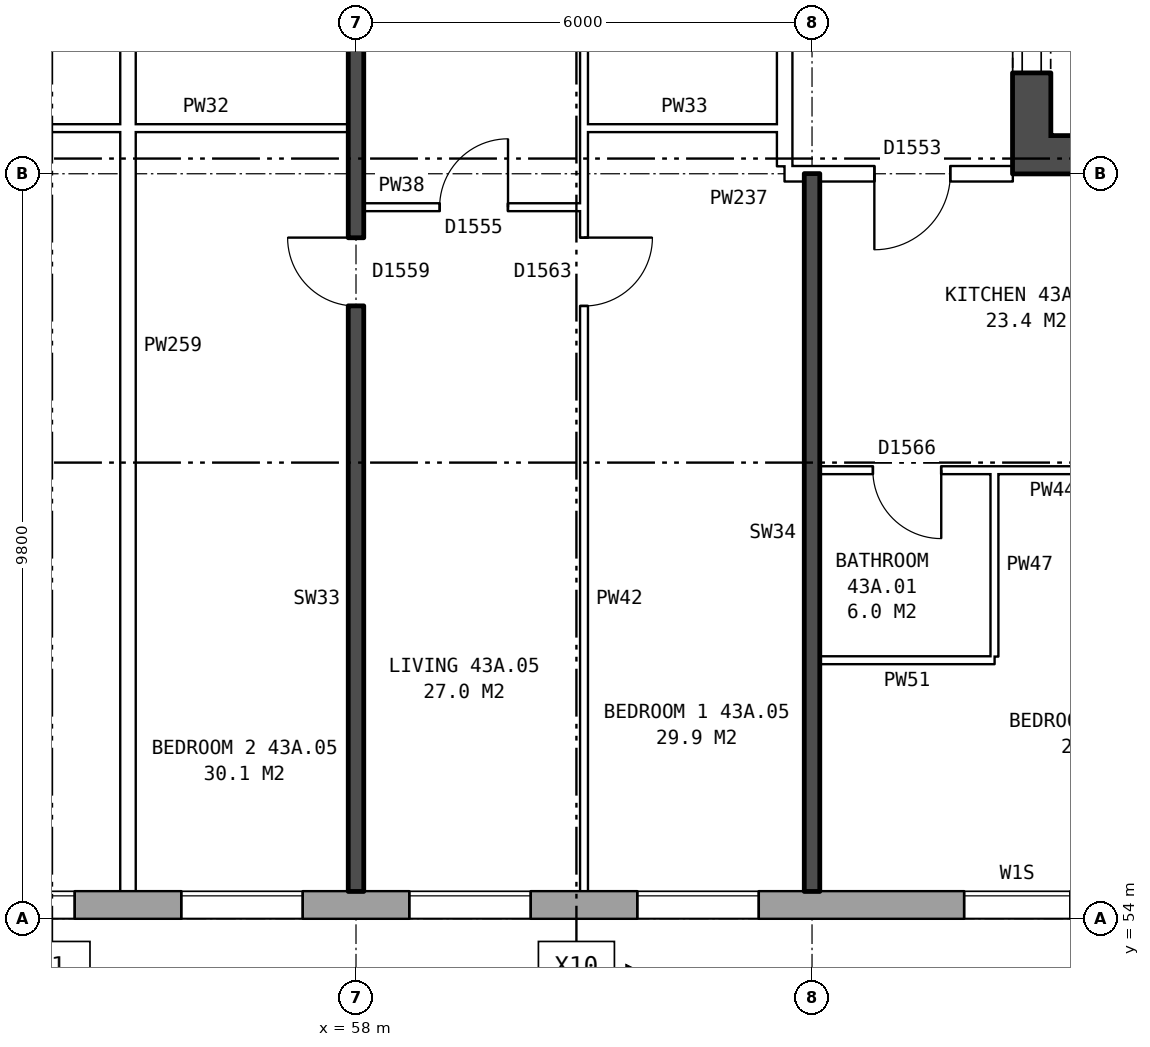
"""IFC4 building model, lengths in metres.
Left out: names, types, materials, properties, quantities, classifications, styles, units other than length and angle.
Written with IfcOpenShell. Run it as: python <this file> out.ifc"""

import sys

from ifc_helpers import new_model, si_unit, direction, frame, frame_2d, origin, place, context, subcontext, project, spatial, rectangle, extrude, element, fill, save


model = new_model("IFC4")
c1 = context("Model", 3, precision=1e-05, world=origin(), true_north=direction((0.0, 1.0)))
c2 = subcontext(c1, "Body", "Model", "MODEL_VIEW")
j1 = project(units=[si_unit("LENGTHUNIT", "METRE"), si_unit("PLANEANGLEUNIT", "RADIAN")], contexts=[c1])
p1 = place(None, origin())
s1 = spatial("IfcSite", under=j1, at=p1, CompositionType="ELEMENT")
p2 = place(p1, origin())
s2 = spatial("IfcBuilding", under=s1, at=p2, CompositionType="ELEMENT")
p3 = place(p2, frame((0.0, 0.0, 154.7)))
s3 = spatial("IfcBuildingStorey", under=s2, at=p3, CompositionType="ELEMENT", Elevation=154.7)
p4 = place(p3, frame((31.575, 54.18, 0.0), z_axis=(0.0, 0.0, 1.0), x_axis=(1.0, 0.0, 0.0)))
e1 = element("IfcWall", 1, at=p4, inside=s3, PredefinedType="STANDARD", context=c2, shape_type="SweptSolid", body=[
    extrude(rectangle(XDim=41.351, YDim=0.36, at=frame_2d((20.675, 0.0))), origin(), (0.0, 0.0, 1.0), 2.85),
])
p5 = place(p4, frame((3.125, 0.0, 0.8)))
e2 = element("IfcOpeningElement", 2, at=p5, cuts=e1, PredefinedType="OPENING", context=c2, shape_type="SweptSolid", body=[
    extrude(rectangle(XDim=1.6, YDim=1.8, at=frame_2d((0.8, 0.9))), frame((0.0, 0.19, 0.0), z_axis=(0.0, -1.0, 0.0), x_axis=(1.0, 0.0, 0.0)), (0.0, 0.0, 1.0), 0.38),
])
p6 = place(p4, frame((5.025, 0.0, 1.0)))
e3 = element("IfcOpeningElement", 3, at=p6, cuts=e1, PredefinedType="OPENING", context=c2, shape_type="SweptSolid", body=[
    extrude(rectangle(XDim=1.0, YDim=1.5, at=frame_2d((0.5, 0.75))), frame((0.0, 0.19, 0.0), z_axis=(0.0, -1.0, 0.0), x_axis=(1.0, 0.0, 0.0)), (0.0, 0.0, 1.0), 0.38),
])
p7 = place(p4, frame((9.125, 0.0, 0.8)))
e4 = element("IfcOpeningElement", 4, at=p7, cuts=e1, PredefinedType="OPENING", context=c2, shape_type="SweptSolid", body=[
    extrude(rectangle(XDim=1.6, YDim=1.8, at=frame_2d((0.8, 0.9))), frame((0.0, 0.19, 0.0), z_axis=(0.0, -1.0, 0.0), x_axis=(1.0, 0.0, 0.0)), (0.0, 0.0, 1.0), 0.38),
])
p8 = place(p4, frame((12.125, 0.0, 0.8)))
e5 = element("IfcOpeningElement", 5, at=p8, cuts=e1, PredefinedType="OPENING", context=c2, shape_type="SweptSolid", body=[
    extrude(rectangle(XDim=1.6, YDim=1.8, at=frame_2d((0.8, 0.9))), frame((0.0, 0.19, 0.0), z_axis=(0.0, -1.0, 0.0), x_axis=(1.0, 0.0, 0.0)), (0.0, 0.0, 1.0), 0.38),
])
p9 = place(p4, frame((15.125, 0.0, 0.8)))
e6 = element("IfcOpeningElement", 6, at=p9, cuts=e1, PredefinedType="OPENING", context=c2, shape_type="SweptSolid", body=[
    extrude(rectangle(XDim=1.6, YDim=1.8, at=frame_2d((0.8, 0.9))), frame((0.0, 0.19, 0.0), z_axis=(0.0, -1.0, 0.0), x_axis=(1.0, 0.0, 0.0)), (0.0, 0.0, 1.0), 0.38),
])
p10 = place(p4, frame((18.125, 0.0, 0.8)))
e7 = element("IfcOpeningElement", 7, at=p10, cuts=e1, PredefinedType="OPENING", context=c2, shape_type="SweptSolid", body=[
    extrude(rectangle(XDim=1.6, YDim=1.8, at=frame_2d((0.8, 0.9))), frame((0.0, 0.19, 0.0), z_axis=(0.0, -1.0, 0.0), x_axis=(1.0, 0.0, 0.0)), (0.0, 0.0, 1.0), 0.38),
])
p11 = place(p4, frame((21.125, 0.0, 0.8)))
e8 = element("IfcOpeningElement", 8, at=p11, cuts=e1, PredefinedType="OPENING", context=c2, shape_type="SweptSolid", body=[
    extrude(rectangle(XDim=1.6, YDim=1.8, at=frame_2d((0.8, 0.9))), frame((0.0, 0.19, 0.0), z_axis=(0.0, -1.0, 0.0), x_axis=(1.0, 0.0, 0.0)), (0.0, 0.0, 1.0), 0.38),
])
p12 = place(p4, frame((24.125, 0.0, 0.8)))
e9 = element("IfcOpeningElement", 9, at=p12, cuts=e1, PredefinedType="OPENING", context=c2, shape_type="SweptSolid", body=[
    extrude(rectangle(XDim=1.6, YDim=1.8, at=frame_2d((0.8, 0.9))), frame((0.0, 0.19, 0.0), z_axis=(0.0, -1.0, 0.0), x_axis=(1.0, 0.0, 0.0)), (0.0, 0.0, 1.0), 0.38),
])
p13 = place(p4, frame((27.125, 0.0, 0.8)))
e10 = element("IfcOpeningElement", 10, at=p13, cuts=e1, PredefinedType="OPENING", context=c2, shape_type="SweptSolid", body=[
    extrude(rectangle(XDim=1.6, YDim=1.8, at=frame_2d((0.8, 0.9))), frame((0.0, 0.19, 0.0), z_axis=(0.0, -1.0, 0.0), x_axis=(1.0, 0.0, 0.0)), (0.0, 0.0, 1.0), 0.38),
])
p14 = place(p4, frame((30.125, 0.0, 0.8)))
e11 = element("IfcOpeningElement", 11, at=p14, cuts=e1, PredefinedType="OPENING", context=c2, shape_type="SweptSolid", body=[
    extrude(rectangle(XDim=1.6, YDim=1.8, at=frame_2d((0.8, 0.9))), frame((0.0, 0.19, 0.0), z_axis=(0.0, -1.0, 0.0), x_axis=(1.0, 0.0, 0.0)), (0.0, 0.0, 1.0), 0.38),
])
p15 = place(p4, frame((34.425, 0.0, 1.7)))
e12 = element("IfcOpeningElement", 12, at=p15, cuts=e1, PredefinedType="OPENING", context=c2, shape_type="SweptSolid", body=[
    extrude(rectangle(XDim=1.4, YDim=0.9, at=frame_2d((0.7, 0.45))), frame((0.0, 0.19, 0.0), z_axis=(0.0, -1.0, 0.0), x_axis=(1.0, 0.0, 0.0)), (0.0, 0.0, 1.0), 0.38),
])
p16 = place(p4, frame((36.125, 0.0, 0.8)))
e13 = element("IfcOpeningElement", 13, at=p16, cuts=e1, PredefinedType="OPENING", context=c2, shape_type="SweptSolid", body=[
    extrude(rectangle(XDim=1.6, YDim=1.8, at=frame_2d((0.8, 0.9))), frame((0.0, 0.19, 0.0), z_axis=(0.0, -1.0, 0.0), x_axis=(1.0, 0.0, 0.0)), (0.0, 0.0, 1.0), 0.38),
])
p17 = place(p4, frame((39.125, 0.0, 0.8)))
e14 = element("IfcOpeningElement", 14, at=p17, cuts=e1, PredefinedType="OPENING", context=c2, shape_type="SweptSolid", body=[
    extrude(rectangle(XDim=1.6, YDim=1.8, at=frame_2d((0.8, 0.9))), frame((0.0, 0.19, 0.0), z_axis=(0.0, -1.0, 0.0), x_axis=(1.0, 0.0, 0.0)), (0.0, 0.0, 1.0), 0.38),
])
p18 = place(p4, frame((6.325, 0.0, 1.7)))
e15 = element("IfcOpeningElement", 15, at=p18, cuts=e1, PredefinedType="OPENING", context=c2, shape_type="SweptSolid", body=[
    extrude(rectangle(XDim=0.6, YDim=0.9, at=frame_2d((0.3, 0.45))), frame((0.0, 0.19, 0.0), z_axis=(0.0, -1.0, 0.0), x_axis=(1.0, 0.0, 0.0)), (0.0, 0.0, 1.0), 0.38),
])
p19 = place(p3, frame((66.89, 63.8, 0.0), z_axis=(0.0, 0.0, 1.0), x_axis=(0.0, 1.0, 0.0)))
e16 = element("IfcWall", 16, at=p19, inside=s3, PredefinedType="SHEAR", context=c2, shape_type="SweptSolid", body=[
    extrude(rectangle(XDim=12.4, YDim=0.5, at=frame_2d((6.2, 0.0))), origin(), (0.0, 0.0, 1.0), 2.85),
])
p20 = place(p19, frame((1.325, 0.0, 0.0)))
e17 = element("IfcOpeningElement", 17, at=p20, cuts=e16, PredefinedType="OPENING", context=c2, shape_type="SweptSolid", body=[
    extrude(rectangle(XDim=1.1, YDim=2.1, at=frame_2d((0.55, 1.05))), frame((0.0, 0.26, 0.0), z_axis=(0.0, -1.0, 0.0), x_axis=(1.0, 0.0, 0.0)), (0.0, 0.0, 1.0), 0.52),
])
p21 = place(p19, frame((3.6, 0.0, 0.0)))
e18 = element("IfcOpeningElement", 18, at=p21, cuts=e16, PredefinedType="OPENING", context=c2, shape_type="SweptSolid", body=[
    extrude(rectangle(XDim=1.1, YDim=2.1, at=frame_2d((0.55, 1.05))), frame((0.0, 0.26, 0.0), z_axis=(0.0, -1.0, 0.0), x_axis=(1.0, 0.0, 0.0)), (0.0, 0.0, 1.0), 0.52),
])
p22 = place(p19, frame((5.8, 0.0, 0.0)))
e19 = element("IfcOpeningElement", 19, at=p22, cuts=e16, PredefinedType="OPENING", context=c2, shape_type="SweptSolid", body=[
    extrude(rectangle(XDim=1.1, YDim=2.1, at=frame_2d((0.55, 1.05))), frame((0.0, 0.26, 0.0), z_axis=(0.0, -1.0, 0.0), x_axis=(1.0, 0.0, 0.0)), (0.0, 0.0, 1.0), 0.52),
])
p23 = place(p19, frame((8.0, 0.0, 0.0)))
e20 = element("IfcOpeningElement", 20, at=p23, cuts=e16, PredefinedType="OPENING", context=c2, shape_type="SweptSolid", body=[
    extrude(rectangle(XDim=1.1, YDim=2.1, at=frame_2d((0.55, 1.05))), frame((0.0, 0.26, 0.0), z_axis=(0.0, -1.0, 0.0), x_axis=(1.0, 0.0, 0.0)), (0.0, 0.0, 1.0), 0.52),
])
p24 = place(p19, frame((9.9, 0.0, 0.0)))
e21 = element("IfcOpeningElement", 21, at=p24, cuts=e16, PredefinedType="OPENING", context=c2, shape_type="SweptSolid", body=[
    extrude(rectangle(XDim=1.1, YDim=2.1, at=frame_2d((0.55, 1.05))), frame((0.0, 0.26, 0.0), z_axis=(0.0, -1.0, 0.0), x_axis=(1.0, 0.0, 0.0)), (0.0, 0.0, 1.0), 0.52),
])
p25 = place(p3, frame((67.14, 64.05, 0.0), z_axis=(0.0, 0.0, 1.0), x_axis=(1.0, 0.0, 0.0)))
e22 = element("IfcWall", 22, at=p25, inside=s3, PredefinedType="SHEAR", context=c2, shape_type="SweptSolid", body=[
    extrude(rectangle(XDim=8.0, YDim=0.5, at=frame_2d((4.0, 0.0))), origin(), (0.0, 0.0, 1.0), 2.85),
])
p26 = place(p3, frame((63.64, 63.9, 0.0), z_axis=(0.0, 0.0, 1.0), x_axis=(0.0, 1.0, 0.0)))
e23 = element("IfcWall", 23, at=p26, inside=s3, PredefinedType="PARTITIONING", context=c2, shape_type="SweptSolid", body=[
    extrude(rectangle(XDim=12.2, YDim=0.2, at=frame_2d((6.1, 0.0))), origin(), (0.0, 0.0, 1.0), 2.85),
])
p27 = place(p26, frame((5.1, 0.0, 0.0)))
e24 = element("IfcOpeningElement", 24, at=p27, cuts=e23, PredefinedType="OPENING", context=c2, shape_type="SweptSolid", body=[
    extrude(rectangle(XDim=2.0, YDim=2.1, at=frame_2d((1.0, 1.05))), frame((0.0, 0.11, 0.0), z_axis=(0.0, -1.0, 0.0), x_axis=(1.0, 0.0, 0.0)), (0.0, 0.0, 1.0), 0.22),
])
p28 = place(p3, frame((64.1, 57.4, 0.0), z_axis=(0.0, 0.0, 1.0), x_axis=(1.0, 0.0, 0.0)))
e25 = element("IfcWall", 25, at=p28, inside=s3, PredefinedType="PARTITIONING", context=c2, shape_type="SweptSolid", body=[
    extrude(rectangle(XDim=2.3, YDim=0.1, at=frame_2d((1.15, 0.0))), origin(), (0.0, 0.0, 1.0), 2.85),
])
p29 = place(p3, frame((64.1, 59.9, 0.0), z_axis=(0.0, 0.0, 1.0), x_axis=(1.0, 0.0, 0.0)))
e26 = element("IfcWall", 26, at=p29, inside=s3, PredefinedType="PARTITIONING", context=c2, shape_type="SweptSolid", body=[
    extrude(rectangle(XDim=5.8, YDim=0.1, at=frame_2d((2.9, 0.0))), origin(), (0.0, 0.0, 1.0), 2.85),
])
p30 = place(p29, frame((3.6, 0.0, 0.0)))
e27 = element("IfcOpeningElement", 27, at=p30, cuts=e26, PredefinedType="OPENING", context=c2, shape_type="SweptSolid", body=[
    extrude(rectangle(XDim=0.9, YDim=2.1, at=frame_2d((0.45, 1.05))), frame((0.0, 0.06, 0.0), z_axis=(0.0, -1.0, 0.0), x_axis=(1.0, 0.0, 0.0)), (0.0, 0.0, 1.0), 0.12),
])
p31 = place(p29, frame((0.7, 0.0, 0.0)))
e28 = element("IfcOpeningElement", 28, at=p31, cuts=e26, PredefinedType="OPENING", context=c2, shape_type="SweptSolid", body=[
    extrude(rectangle(XDim=0.9, YDim=2.1, at=frame_2d((0.45, 1.05))), frame((0.0, 0.06, 0.0), z_axis=(0.0, -1.0, 0.0), x_axis=(1.0, 0.0, 0.0)), (0.0, 0.0, 1.0), 0.12),
])
p32 = place(p3, frame((58.1, 63.36, 0.0), z_axis=(0.0, 0.0, 1.0), x_axis=(1.0, 0.0, 0.0)))
e29 = element("IfcWall", 29, at=p32, inside=s3, PredefinedType="PARTITIONING", context=c2, shape_type="SweptSolid", body=[
    extrude(rectangle(XDim=2.9, YDim=0.1, at=frame_2d((1.45, 0.0))), origin(), (0.0, 0.0, 1.0), 2.85),
])
p33 = place(p32, frame((1.0, 0.0, 0.0)))
e30 = element("IfcOpeningElement", 30, at=p33, cuts=e29, PredefinedType="OPENING", context=c2, shape_type="SweptSolid", body=[
    extrude(rectangle(XDim=0.9, YDim=2.1, at=frame_2d((0.45, 1.05))), frame((0.0, 0.06, 0.0), z_axis=(0.0, -1.0, 0.0), x_axis=(1.0, 0.0, 0.0)), (0.0, 0.0, 1.0), 0.12),
])
p34 = place(p3, frame((63.64, 63.8, 0.0), z_axis=(0.0, 0.0, 1.0), x_axis=(1.0, 0.0, 0.0)))
e31 = element("IfcWall", 31, at=p34, inside=s3, PredefinedType="PARTITIONING", context=c2, shape_type="SweptSolid", body=[
    extrude(rectangle(XDim=3.0, YDim=0.2, at=frame_2d((1.5, 0.0))), origin(), (0.0, 0.0, 1.0), 2.85),
])
p35 = place(p34, frame((1.18, 0.0, 0.0)))
e32 = element("IfcOpeningElement", 32, at=p35, cuts=e31, PredefinedType="OPENING", context=c2, shape_type="SweptSolid", body=[
    extrude(rectangle(XDim=1.0, YDim=2.1, at=frame_2d((0.5, 1.05))), frame((0.0, 0.11, 0.0), z_axis=(0.0, -1.0, 0.0), x_axis=(1.0, 0.0, 0.0)), (0.0, 0.0, 1.0), 0.22),
])
p36 = place(p3, frame((52.1, 64.4, 0.0), z_axis=(0.0, 0.0, 1.0), x_axis=(1.0, 0.0, 0.0)))
e33 = element("IfcWall", 33, at=p36, inside=s3, PredefinedType="PARTITIONING", context=c2, shape_type="SweptSolid", body=[
    extrude(rectangle(XDim=5.8, YDim=0.1, at=frame_2d((2.9, 0.0))), origin(), (0.0, 0.0, 1.0), 2.85),
])
p37 = place(p3, frame((61.0, 64.4, 0.0), z_axis=(0.0, 0.0, 1.0), x_axis=(1.0, 0.0, 0.0)))
e34 = element("IfcWall", 34, at=p37, inside=s3, PredefinedType="PARTITIONING", context=c2, shape_type="SweptSolid", body=[
    extrude(rectangle(XDim=2.64, YDim=0.1, at=frame_2d((1.32, 0.0))), origin(), (0.0, 0.0, 1.0), 2.85),
])
p38 = place(p3, frame((55.0, 54.36, 0.0), z_axis=(0.0, 0.0, 1.0), x_axis=(0.0, 1.0, 0.0)))
e35 = element("IfcWall", 35, at=p38, inside=s3, PredefinedType="PARTITIONING", context=c2, shape_type="SweptSolid", body=[
    extrude(rectangle(XDim=14.34, YDim=0.2, at=frame_2d((7.17, 0.0))), origin(), (0.0, 0.0, 1.0), 2.85),
])
p39 = place(p3, frame((58.0, 54.36, 0.0), z_axis=(0.0, 0.0, 1.0), x_axis=(0.0, 1.0, 0.0)))
e36 = element("IfcWall", 36, at=p39, inside=s3, PredefinedType="SOLIDWALL", context=c2, shape_type="SweptSolid", body=[
    extrude(rectangle(XDim=14.44, YDim=0.2, at=frame_2d((7.22, 0.0))), origin(), (0.0, 0.0, 1.0), 2.85),
])
p40 = place(p39, frame((7.7, 0.0, 0.0)))
e37 = element("IfcOpeningElement", 37, at=p40, cuts=e36, PredefinedType="OPENING", context=c2, shape_type="SweptSolid", body=[
    extrude(rectangle(XDim=0.9, YDim=2.1, at=frame_2d((0.45, 1.05))), frame((0.0, 0.11, 0.0), z_axis=(0.0, -1.0, 0.0), x_axis=(1.0, 0.0, 0.0)), (0.0, 0.0, 1.0), 0.22),
])
p41 = place(p39, frame((13.14, 0.0, 0.0)))
e38 = element("IfcOpeningElement", 38, at=p41, cuts=e36, PredefinedType="OPENING", context=c2, shape_type="SweptSolid", body=[
    extrude(rectangle(XDim=0.9, YDim=2.1, at=frame_2d((0.45, 1.05))), frame((0.0, 0.11, 0.0), z_axis=(0.0, -1.0, 0.0), x_axis=(1.0, 0.0, 0.0)), (0.0, 0.0, 1.0), 0.22),
])
p42 = place(p3, frame((61.0, 54.36, 0.0), z_axis=(0.0, 0.0, 1.0), x_axis=(0.0, 1.0, 0.0)))
e39 = element("IfcWall", 39, at=p42, inside=s3, PredefinedType="PARTITIONING", context=c2, shape_type="SweptSolid", body=[
    extrude(rectangle(XDim=14.34, YDim=0.1, at=frame_2d((7.17, 0.0))), origin(), (0.0, 0.0, 1.0), 2.85),
])
p43 = place(p42, frame((7.7, 0.0, 0.0)))
e40 = element("IfcOpeningElement", 40, at=p43, cuts=e39, PredefinedType="OPENING", context=c2, shape_type="SweptSolid", body=[
    extrude(rectangle(XDim=0.9, YDim=2.1, at=frame_2d((0.45, 1.05))), frame((0.0, 0.06, 0.0), z_axis=(0.0, -1.0, 0.0), x_axis=(1.0, 0.0, 0.0)), (0.0, 0.0, 1.0), 0.12),
])
p44 = place(p42, frame((13.04, 0.0, 0.0)))
e41 = element("IfcOpeningElement", 41, at=p44, cuts=e39, PredefinedType="OPENING", context=c2, shape_type="SweptSolid", body=[
    extrude(rectangle(XDim=0.9, YDim=2.1, at=frame_2d((0.45, 1.05))), frame((0.0, 0.06, 0.0), z_axis=(0.0, -1.0, 0.0), x_axis=(1.0, 0.0, 0.0)), (0.0, 0.0, 1.0), 0.12),
])
p45 = place(p3, frame((64.0, 54.36, 0.0), z_axis=(0.0, 0.0, 1.0), x_axis=(0.0, 1.0, 0.0)))
e42 = element("IfcWall", 42, at=p45, inside=s3, PredefinedType="SOLIDWALL", context=c2, shape_type="SweptSolid", body=[
    extrude(rectangle(XDim=9.44, YDim=0.2, at=frame_2d((4.72, 0.0))), origin(), (0.0, 0.0, 1.0), 2.85),
])
p46 = place(p3, frame((66.4, 57.45, 0.0), z_axis=(0.0, 0.0, 1.0), x_axis=(0.0, 1.0, 0.0)))
e43 = element("IfcWall", 43, at=p46, inside=s3, PredefinedType="PARTITIONING", context=c2, shape_type="SweptSolid", body=[
    extrude(rectangle(XDim=2.4, YDim=0.1, at=frame_2d((1.2, 0.0))), origin(), (0.0, 0.0, 1.0), 2.85),
])
p47 = place(p11, origin())
e44 = element("IfcWindow", 44, at=p47, inside=s3, PartitioningType="SINGLE_PANEL", PredefinedType="WINDOW", context=c2, shape_type="SweptSolid", body=[
    extrude(rectangle(XDim=1.6, YDim=1.8, at=frame_2d((0.8, 0.9))), frame((0.0, 0.15, 0.0), z_axis=(0.0, -1.0, 0.0), x_axis=(1.0, 0.0, 0.0)), (0.0, 0.0, 1.0), 0.06),
])
fill(e8, e44)
p48 = place(p12, origin())
e45 = element("IfcWindow", 45, at=p48, inside=s3, PartitioningType="SINGLE_PANEL", PredefinedType="WINDOW", context=c2, shape_type="SweptSolid", body=[
    extrude(rectangle(XDim=1.6, YDim=1.8, at=frame_2d((0.8, 0.9))), frame((0.0, 0.15, 0.0), z_axis=(0.0, -1.0, 0.0), x_axis=(1.0, 0.0, 0.0)), (0.0, 0.0, 1.0), 0.06),
])
fill(e9, e45)
p49 = place(p13, origin())
e46 = element("IfcWindow", 46, at=p49, inside=s3, PartitioningType="SINGLE_PANEL", PredefinedType="WINDOW", context=c2, shape_type="SweptSolid", body=[
    extrude(rectangle(XDim=1.6, YDim=1.8, at=frame_2d((0.8, 0.9))), frame((0.0, 0.15, 0.0), z_axis=(0.0, -1.0, 0.0), x_axis=(1.0, 0.0, 0.0)), (0.0, 0.0, 1.0), 0.06),
])
fill(e10, e46)
p50 = place(p14, origin())
e47 = element("IfcWindow", 47, at=p50, inside=s3, PartitioningType="SINGLE_PANEL", PredefinedType="WINDOW", context=c2, shape_type="SweptSolid", body=[
    extrude(rectangle(XDim=1.6, YDim=1.8, at=frame_2d((0.8, 0.9))), frame((0.0, 0.15, 0.0), z_axis=(0.0, -1.0, 0.0), x_axis=(1.0, 0.0, 0.0)), (0.0, 0.0, 1.0), 0.06),
])
fill(e11, e47)
p51 = place(p15, origin())
e48 = element("IfcWindow", 48, at=p51, inside=s3, PartitioningType="SINGLE_PANEL", PredefinedType="WINDOW", context=c2, shape_type="SweptSolid", body=[
    extrude(rectangle(XDim=1.4, YDim=0.9, at=frame_2d((0.7, 0.45))), frame((0.0, 0.15, 0.0), z_axis=(0.0, -1.0, 0.0), x_axis=(1.0, 0.0, 0.0)), (0.0, 0.0, 1.0), 0.06),
])
fill(e12, e48)
p52 = place(p20, origin())
e49 = element("IfcDoor", 49, at=p52, inside=s3, OperationType="DOUBLE_DOOR_SLIDING", PredefinedType="DOOR", context=c2, shape_type="SweptSolid", body=[
    extrude(rectangle(XDim=1.1, YDim=2.1, at=frame_2d((0.55, 1.05))), frame((0.0, -0.185, 0.0), z_axis=(0.0, -1.0, 0.0), x_axis=(1.0, 0.0, 0.0)), (0.0, 0.0, 1.0), 0.05),
])
fill(e17, e49)
p53 = place(p35, frame((1.0, 0.0, 0.0), z_axis=(0.0, 0.0, 1.0), x_axis=(-1.0, 0.0, 0.0)))
e50 = element("IfcDoor", 50, at=p53, inside=s3, OperationType="SINGLE_SWING_RIGHT", PredefinedType="DOOR", context=c2, shape_type="SweptSolid", body=[
    extrude(rectangle(XDim=1.0, YDim=2.1, at=frame_2d((0.5, 1.05))), frame((0.0, 0.025, 0.0), z_axis=(0.0, -1.0, 0.0), x_axis=(1.0, 0.0, 0.0)), (0.0, 0.0, 1.0), 0.05),
])
fill(e32, e50)
p54 = place(p31, frame((0.9, 0.0, 0.0), z_axis=(0.0, 0.0, 1.0), x_axis=(-1.0, 0.0, 0.0)))
e51 = element("IfcDoor", 51, at=p54, inside=s3, OperationType="SINGLE_SWING_LEFT", PredefinedType="DOOR", context=c2, shape_type="SweptSolid", body=[
    extrude(rectangle(XDim=0.9, YDim=2.1, at=frame_2d((0.45, 1.05))), frame((0.0, 0.025, 0.0), z_axis=(0.0, -1.0, 0.0), x_axis=(1.0, 0.0, 0.0)), (0.0, 0.0, 1.0), 0.05),
])
fill(e28, e51)
p55 = place(p43, frame((0.9, 0.0, 0.0), z_axis=(0.0, 0.0, 1.0), x_axis=(-1.0, 0.0, 0.0)))
e52 = element("IfcDoor", 52, at=p55, inside=s3, OperationType="SINGLE_SWING_LEFT", PredefinedType="DOOR", context=c2, shape_type="SweptSolid", body=[
    extrude(rectangle(XDim=0.9, YDim=2.1, at=frame_2d((0.45, 1.05))), frame((0.0, 0.025, 0.0), z_axis=(0.0, -1.0, 0.0), x_axis=(1.0, 0.0, 0.0)), (0.0, 0.0, 1.0), 0.05),
])
fill(e40, e52)
p56 = place(p40, origin())
e53 = element("IfcDoor", 53, at=p56, inside=s3, OperationType="SINGLE_SWING_RIGHT", PredefinedType="DOOR", context=c2, shape_type="SweptSolid", body=[
    extrude(rectangle(XDim=0.9, YDim=2.1, at=frame_2d((0.45, 1.05))), frame((0.0, 0.025, 0.0), z_axis=(0.0, -1.0, 0.0), x_axis=(1.0, 0.0, 0.0)), (0.0, 0.0, 1.0), 0.05),
])
fill(e37, e53)
p57 = place(p33, origin())
e54 = element("IfcDoor", 54, at=p57, inside=s3, OperationType="SINGLE_SWING_RIGHT", PredefinedType="DOOR", context=c2, shape_type="SweptSolid", body=[
    extrude(rectangle(XDim=0.9, YDim=2.1, at=frame_2d((0.45, 1.05))), frame((0.0, 0.025, 0.0), z_axis=(0.0, -1.0, 0.0), x_axis=(1.0, 0.0, 0.0)), (0.0, 0.0, 1.0), 0.05),
])
fill(e30, e54)
save(model, sys.argv[1])
